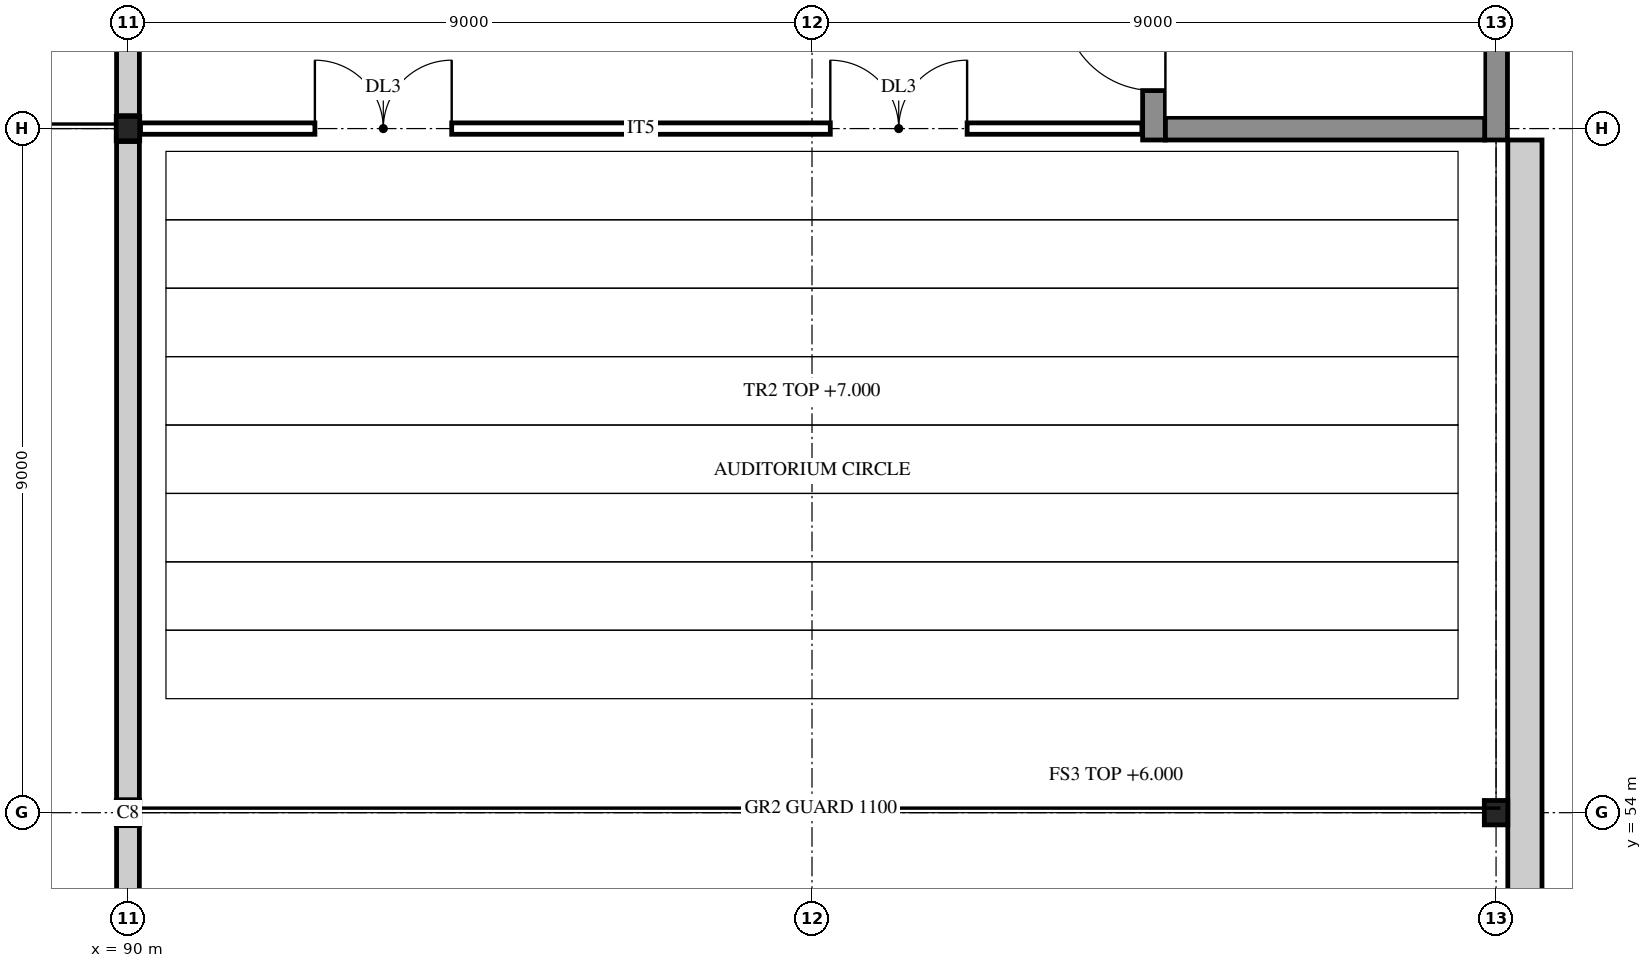
"""IFC4 building model, lengths in metres.
Left out: names, types, materials, properties, quantities, classifications, styles, units other than length and angle.
Written with IfcOpenShell. Run it as: python <this file> out.ifc"""

import sys

from ifc_helpers import new_model, si_unit, direction, frame, frame_2d, origin, origin_2d, place, context, subcontext, project, spatial, rectangle, i_section, extrude, element, fill, save


model = new_model("IFC4")
c1 = context("Model", 3, precision=1e-05, world=origin(), true_north=direction((0.0, 1.0)))
c2 = subcontext(c1, "Body", "Model", "MODEL_VIEW")
j1 = project(units=[si_unit("LENGTHUNIT", "METRE"), si_unit("PLANEANGLEUNIT", "RADIAN")], contexts=[c1])
p1 = place(None, origin())
s1 = spatial("IfcSite", under=j1, at=p1, CompositionType="ELEMENT")
p2 = place(p1, origin())
s2 = spatial("IfcBuilding", under=s1, at=p2, CompositionType="ELEMENT")
p3 = place(p2, frame((0.0, 0.0, 6.0)))
s3 = spatial("IfcBuildingStorey", under=s2, at=p3, CompositionType="ELEMENT", Elevation=6.0)
for number, where, z_axis, x_axis in (
    (1, (90.0, 54.0, 0.0), (0.0, 0.0, 1.0), (1.0, 0.0, 0.0)),
    (2, (90.0, 63.0, 0.0), (0.0, 0.0, 1.0), (1.0, 0.0, 0.0)),
    (3, (108.0, 54.0, 0.0), (0.0, 0.0, 1.0), (1.0, 0.0, 0.0)),
):
    element("IfcColumn", number, at=place(p3, frame(where, z_axis=z_axis, x_axis=x_axis)), inside=s3, PredefinedType="COLUMN", context=c2, shape_type="SweptSolid", body=[
        extrude(i_section(OverallWidth=0.309, OverallDepth=0.321, WebThickness=0.014, FlangeThickness=0.022, FilletRadius=0.017, at=origin_2d()), origin(), (0.0, 0.0, 1.0), 4.5),
    ])
p4 = place(p3, frame((103.5, 62.85, 0.0), z_axis=(0.0, 0.0, 1.0), x_axis=(0.0, 1.0, 0.0)))
e4 = element("IfcWall", 4, at=p4, inside=s3, PredefinedType="SHEAR", context=c2, shape_type="SweptSolid", body=[
    extrude(rectangle(XDim=9.3, YDim=0.3, at=frame_2d((4.65, 0.0))), origin(), (0.0, 0.0, 1.0), 4.5),
])
p5 = place(p4, frame((0.65, 0.0, 0.0)))
e5 = element("IfcOpeningElement", 5, at=p5, cuts=e4, PredefinedType="OPENING", context=c2, shape_type="SweptSolid", body=[
    extrude(rectangle(XDim=1.2, YDim=2.1, at=frame_2d((0.6, 1.05))), frame((0.0, 0.16, 0.0), z_axis=(0.0, -1.0, 0.0), x_axis=(1.0, 0.0, 0.0)), (0.0, 0.0, 1.0), 0.32),
])
p6 = place(p3, frame((108.0, 62.85, 0.0), z_axis=(0.0, 0.0, 1.0), x_axis=(0.0, 1.0, 0.0)))
e6 = element("IfcWall", 6, at=p6, inside=s3, PredefinedType="SHEAR", context=c2, shape_type="SweptSolid", body=[
    extrude(rectangle(XDim=9.3, YDim=0.3, at=frame_2d((4.65, 0.0))), origin(), (0.0, 0.0, 1.0), 4.5),
])
p7 = place(p3, frame((103.65, 63.0, 0.0), z_axis=(0.0, 0.0, 1.0), x_axis=(1.0, 0.0, 0.0)))
e7 = element("IfcWall", 7, at=p7, inside=s3, PredefinedType="SHEAR", context=c2, shape_type="SweptSolid", body=[
    extrude(rectangle(XDim=4.2, YDim=0.3, at=frame_2d((2.1, 0.0))), origin(), (0.0, 0.0, 1.0), 4.5),
])
p8 = place(p3, frame((108.379, 62.85, 0.0), z_axis=(0.0, 0.0, 1.0), x_axis=(0.0, -1.0, 0.0)))
e8 = element("IfcWall", 8, at=p8, inside=s3, PredefinedType="STANDARD", context=c2, shape_type="SweptSolid", body=[
    extrude(rectangle(XDim=17.7, YDim=0.45, at=frame_2d((8.85, 0.0))), origin(), (0.0, 0.0, 1.0), 4.5),
])
for number, where, z_axis, x_axis in (
    (9, (90.0, 45.17, 0.0), (0.0, 0.0, 1.0), (0.0, 1.0, 0.0)),
    (10, (90.0, 54.17, 0.0), (0.0, 0.0, 1.0), (0.0, 1.0, 0.0)),
):
    element("IfcWall", number, at=place(p3, frame(where, z_axis=z_axis, x_axis=x_axis)), inside=s3, PredefinedType="STANDARD", context=c2, shape_type="SweptSolid", body=[
        extrude(rectangle(XDim=8.659, YDim=0.3, at=frame_2d((4.33, 0.0))), origin(), (0.0, 0.0, 1.0), 3.718),
    ])
p9 = place(p3, frame((90.0, 63.17, 0.0), z_axis=(0.0, 0.0, 1.0), x_axis=(0.0, 1.0, 0.0)))
e11 = element("IfcWall", 11, at=p9, inside=s3, PredefinedType="STANDARD", context=c2, shape_type="SweptSolid", body=[
    extrude(rectangle(XDim=8.659, YDim=0.3, at=frame_2d((4.33, 0.0))), origin(), (0.0, 0.0, 1.0), 3.718),
])
p10 = place(p9, frame((1.179, 0.0, 0.0)))
e12 = element("IfcOpeningElement", 12, at=p10, cuts=e11, PredefinedType="OPENING", context=c2, shape_type="SweptSolid", body=[
    extrude(rectangle(XDim=1.8, YDim=2.1, at=frame_2d((0.9, 1.05))), frame((0.0, 0.16, 0.0), z_axis=(0.0, -1.0, 0.0), x_axis=(1.0, 0.0, 0.0)), (0.0, 0.0, 1.0), 0.32),
])
p11 = place(p3, frame((90.165, 63.0, 0.0), z_axis=(0.0, 0.0, 1.0), x_axis=(1.0, 0.0, 0.0)))
e13 = element("IfcWall", 13, at=p11, inside=s3, PredefinedType="PARTITIONING", context=c2, shape_type="SweptSolid", body=[
    extrude(rectangle(XDim=13.176, YDim=0.15, at=frame_2d((6.588, 0.0))), origin(), (0.0, 0.0, 1.0), 3.718),
])
p12 = place(p11, frame((2.295, 0.0, 0.0)))
e14 = element("IfcOpeningElement", 14, at=p12, cuts=e13, PredefinedType="OPENING", context=c2, shape_type="SweptSolid", body=[
    extrude(rectangle(XDim=1.8, YDim=2.1, at=frame_2d((0.9, 1.05))), frame((0.0, 0.085, 0.0), z_axis=(0.0, -1.0, 0.0), x_axis=(1.0, 0.0, 0.0)), (0.0, 0.0, 1.0), 0.17),
])
p13 = place(p11, frame((9.076, 0.0, 0.0)))
e15 = element("IfcOpeningElement", 15, at=p13, cuts=e13, PredefinedType="OPENING", context=c2, shape_type="SweptSolid", body=[
    extrude(rectangle(XDim=1.8, YDim=2.1, at=frame_2d((0.9, 1.05))), frame((0.0, 0.085, 0.0), z_axis=(0.0, -1.0, 0.0), x_axis=(1.0, 0.0, 0.0)), (0.0, 0.0, 1.0), 0.17),
])
p14 = place(p12, origin())
e16 = element("IfcDoor", 16, at=p14, inside=s3, OperationType="DOUBLE_DOOR_SINGLE_SWING", PredefinedType="DOOR", context=c2, shape_type="SweptSolid", body=[
    extrude(rectangle(XDim=1.8, YDim=2.1, at=frame_2d((0.9, 1.05))), frame((0.0, 0.025, 0.0), z_axis=(0.0, -1.0, 0.0), x_axis=(1.0, 0.0, 0.0)), (0.0, 0.0, 1.0), 0.05),
])
fill(e14, e16)
p15 = place(p13, origin())
e17 = element("IfcDoor", 17, at=p15, inside=s3, OperationType="DOUBLE_DOOR_SINGLE_SWING", PredefinedType="DOOR", context=c2, shape_type="SweptSolid", body=[
    extrude(rectangle(XDim=1.8, YDim=2.1, at=frame_2d((0.9, 1.05))), frame((0.0, 0.025, 0.0), z_axis=(0.0, -1.0, 0.0), x_axis=(1.0, 0.0, 0.0)), (0.0, 0.0, 1.0), 0.05),
])
fill(e15, e17)
p16 = place(p5, frame((1.2, 0.0, 0.0), z_axis=(0.0, 0.0, 1.0), x_axis=(-1.0, 0.0, 0.0)))
e18 = element("IfcDoor", 18, at=p16, inside=s3, OperationType="SINGLE_SWING_RIGHT", PredefinedType="DOOR", context=c2, shape_type="SweptSolid", body=[
    extrude(rectangle(XDim=1.2, YDim=2.1, at=frame_2d((0.6, 1.05))), frame((0.0, 0.025, 0.0), z_axis=(0.0, -1.0, 0.0), x_axis=(1.0, 0.0, 0.0)), (0.0, 0.0, 1.0), 0.05),
])
fill(e5, e18)
save(model, sys.argv[1])
